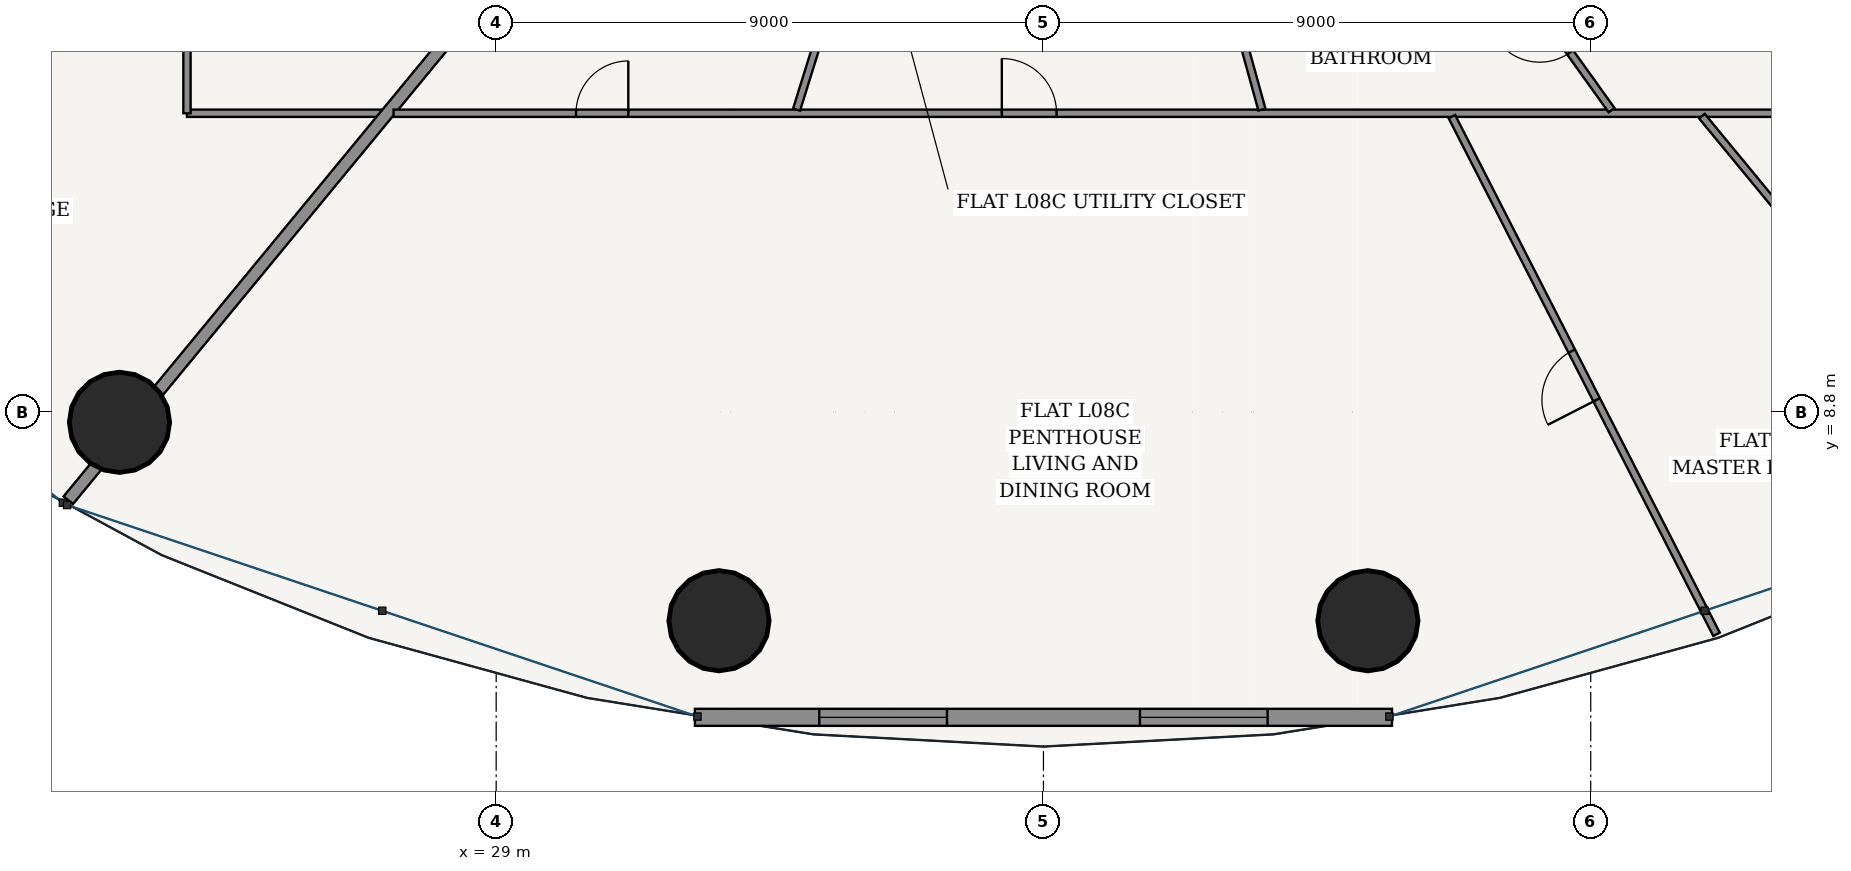
"""IFC4 building model, lengths in metres.
Left out: names, types, materials, properties, quantities, classifications, styles, units other than length and angle.
Written with IfcOpenShell. Run it as: python <this file> out.ifc"""

import sys

from ifc_helpers import new_model, si_unit, direction, frame, frame_2d, origin, origin_2d, place, context, subcontext, project, spatial, rectangle, hollow_circle, extrude, source, transform, mapped, element, fill, save


model = new_model("IFC4")
c1 = context("Model", 3, precision=1e-05, world=origin(), true_north=direction((-0.2419218956, 0.970295726276)))
c2 = subcontext(c1, "Body", "Model", "MODEL_VIEW")
j1 = project(units=[si_unit("LENGTHUNIT", "METRE"), si_unit("PLANEANGLEUNIT", "RADIAN")], contexts=[c1])
p1 = place(None, origin())
s1 = spatial("IfcSite", under=j1, at=p1, CompositionType="ELEMENT")
p2 = place(p1, origin())
s2 = spatial("IfcBuilding", under=s1, at=p2, CompositionType="ELEMENT")
p3 = place(p2, frame((0.0, 0.0, 34.8)))
s3 = spatial("IfcBuildingStorey", under=s2, at=p3, CompositionType="ELEMENT", Elevation=34.8)
for number, where, z_axis, x_axis in (
    (1, (22.805, 8.632, 0.0), (0.0, 0.0, 1.0), (1.0, 0.0, 0.0)),
    (2, (32.664, 5.37, 0.0), (0.0, 0.0, 1.0), (1.0, 0.0, 0.0)),
    (3, (43.336, 5.37, 0.0), (0.0, 0.0, 1.0), (1.0, 0.0, 0.0)),
):
    element("IfcColumn", number, at=place(p3, frame(where, z_axis=z_axis, x_axis=x_axis)), inside=s3, PredefinedType="COLUMN", context=c2, shape_type="SweptSolid", body=[
        extrude(hollow_circle(Radius=0.825, WallThickness=0.05, at=origin_2d()), origin(), (0.0, 0.0, 1.0), 3.6),
    ])
p4 = place(p3, frame((32.268, 3.781, 0.0), z_axis=(0.0, 0.0, 1.0), x_axis=(1.0, 0.0, 0.0)))
e4 = element("IfcWall", 4, at=p4, inside=s3, PredefinedType="SOLIDWALL", context=c2, shape_type="SweptSolid", body=[
    extrude(rectangle(XDim=11.463, YDim=0.28, at=frame_2d((5.732, 0.0))), origin(), (0.0, 0.0, 1.0), 3.32),
])
p5 = place(p4, frame((2.045, 0.0, 0.85)))
e5 = element("IfcOpeningElement", 5, at=p5, cuts=e4, PredefinedType="OPENING", context=c2, shape_type="SweptSolid", body=[
    extrude(rectangle(XDim=2.1, YDim=1.95, at=frame_2d((1.05, 0.975))), frame((0.0, 0.15, 0.0), z_axis=(0.0, -1.0, 0.0), x_axis=(1.0, 0.0, 0.0)), (0.0, 0.0, 1.0), 0.3),
])
p6 = place(p4, frame((7.318, 0.0, 0.85)))
e6 = element("IfcOpeningElement", 6, at=p6, cuts=e4, PredefinedType="OPENING", context=c2, shape_type="SweptSolid", body=[
    extrude(rectangle(XDim=2.1, YDim=1.95, at=frame_2d((1.05, 0.975))), frame((0.0, 0.15, 0.0), z_axis=(0.0, -1.0, 0.0), x_axis=(1.0, 0.0, 0.0)), (0.0, 0.0, 1.0), 0.3),
])
p7 = place(p3, frame((27.109, 13.715, 0.0), z_axis=(0.0, 0.0, 1.0), x_axis=(-1.0, 0.0, 0.0)))
e7 = element("IfcWall", 7, at=p7, inside=s3, PredefinedType="PARTITIONING", context=c2, shape_type="SweptSolid", body=[
    extrude(rectangle(XDim=3.194, YDim=0.12, at=frame_2d((1.597, 0.0))), origin(), (0.0, 0.0, 1.0), 2.688),
])
p8 = place(p3, frame((23.915, 13.715, 0.0), z_axis=(0.0, 0.0, 1.0), x_axis=(0.0, 1.0, 0.0)))
e8 = element("IfcWall", 8, at=p8, inside=s3, PredefinedType="PARTITIONING", context=c2, shape_type="SweptSolid", body=[
    extrude(rectangle(XDim=26.17, YDim=0.12, at=frame_2d((13.085, 0.0))), origin(), (0.0, 0.0, 1.0), 2.688),
])
p9 = place(p8, frame((1.895, 0.0, 0.0)))
e9 = element("IfcOpeningElement", 9, at=p9, cuts=e8, PredefinedType="OPENING", context=c2, shape_type="SweptSolid", body=[
    extrude(rectangle(XDim=0.9, YDim=2.15, at=frame_2d((0.45, 1.075))), frame((0.0, 0.07, 0.0), z_axis=(0.0, -1.0, 0.0), x_axis=(1.0, 0.0, 0.0)), (0.0, 0.0, 1.0), 0.14),
])
p10 = place(p8, frame((11.498, 0.0, 0.0)))
e10 = element("IfcOpeningElement", 10, at=p10, cuts=e8, PredefinedType="OPENING", context=c2, shape_type="SweptSolid", body=[
    extrude(rectangle(XDim=0.9, YDim=2.15, at=frame_2d((0.45, 1.075))), frame((0.0, 0.07, 0.0), z_axis=(0.0, -1.0, 0.0), x_axis=(1.0, 0.0, 0.0)), (0.0, 0.0, 1.0), 0.14),
])
p11 = place(p8, frame((23.831, 0.0, 0.0)))
e11 = element("IfcOpeningElement", 11, at=p11, cuts=e8, PredefinedType="OPENING", context=c2, shape_type="SweptSolid", body=[
    extrude(rectangle(XDim=0.86, YDim=2.15, at=frame_2d((0.43, 1.075))), frame((0.0, 0.07, 0.0), z_axis=(0.0, -1.0, 0.0), x_axis=(1.0, 0.0, 0.0)), (0.0, 0.0, 1.0), 0.14),
])
p12 = place(p3, frame((23.861, 19.144, 0.0), z_axis=(0.0, 0.0, 1.0), x_axis=(-0.879372452045, -0.476134529922, 0.0)))
e12 = element("IfcWall", 12, at=p12, inside=s3, PredefinedType="PARTITIONING", context=c2, shape_type="SweptSolid", body=[
    extrude(rectangle(XDim=11.219, YDim=0.12, at=frame_2d((5.61, 0.0))), origin(), (0.0, 0.0, 1.0), 2.688),
])
p13 = place(p12, frame((4.097, 0.0, 0.0)))
e13 = element("IfcOpeningElement", 13, at=p13, cuts=e12, PredefinedType="OPENING", context=c2, shape_type="SweptSolid", body=[
    extrude(rectangle(XDim=0.9, YDim=2.15, at=frame_2d((0.45, 1.075))), frame((0.0, 0.07, 0.0), z_axis=(0.0, -1.0, 0.0), x_axis=(1.0, 0.0, 0.0)), (0.0, 0.0, 1.0), 0.14),
])
p14 = place(p3, frame((29.396, 16.365, 0.0), z_axis=(0.0, 0.0, 1.0), x_axis=(-0.636186165667, -0.771535587393, 0.0)))
e14 = element("IfcWall", 14, at=p14, inside=s3, PredefinedType="PARTITIONING", context=c2, shape_type="SweptSolid", body=[
    extrude(rectangle(XDim=11.683, YDim=0.2, at=frame_2d((5.842, 0.0))), origin(), (0.0, 0.0, 1.0), 2.688),
])
p15 = place(p3, frame((52.085, 13.715, 0.0), z_axis=(0.0, 0.0, 1.0), x_axis=(-1.0, 0.0, 0.0)))
e15 = element("IfcWall", 15, at=p15, inside=s3, PredefinedType="PARTITIONING", context=c2, shape_type="SweptSolid", body=[
    extrude(rectangle(XDim=24.772, YDim=0.12, at=frame_2d((12.386, 0.0))), origin(), (0.0, 0.0, 1.0), 2.688),
])
p16 = place(p15, frame((20.912, 0.0, 0.0)))
e16 = element("IfcOpeningElement", 16, at=p16, cuts=e15, PredefinedType="OPENING", context=c2, shape_type="SweptSolid", body=[
    extrude(rectangle(XDim=0.86, YDim=2.15, at=frame_2d((0.43, 1.075))), frame((0.0, 0.07, 0.0), z_axis=(0.0, -1.0, 0.0), x_axis=(1.0, 0.0, 0.0)), (0.0, 0.0, 1.0), 0.14),
])
p17 = place(p15, frame((13.87, 0.0, 0.0)))
e17 = element("IfcOpeningElement", 17, at=p17, cuts=e15, PredefinedType="OPENING", context=c2, shape_type="SweptSolid", body=[
    extrude(rectangle(XDim=0.9, YDim=2.15, at=frame_2d((0.45, 1.075))), frame((0.0, 0.07, 0.0), z_axis=(0.0, -1.0, 0.0), x_axis=(1.0, 0.0, 0.0)), (0.0, 0.0, 1.0), 0.14),
])
p18 = place(p3, frame((44.717, 13.66, 0.0), z_axis=(0.0, 0.0, 1.0), x_axis=(0.455131303234, -0.890424335256, 0.0)))
e18 = element("IfcWall", 18, at=p18, inside=s3, PredefinedType="PARTITIONING", context=c2, shape_type="SweptSolid", body=[
    extrude(rectangle(XDim=9.562, YDim=0.12, at=frame_2d((4.781, 0.0))), origin(), (0.0, 0.0, 1.0), 2.762),
])
p19 = place(p18, frame((4.331, 0.0, 0.0)))
e19 = element("IfcOpeningElement", 19, at=p19, cuts=e18, PredefinedType="OPENING", context=c2, shape_type="SweptSolid", body=[
    extrude(rectangle(XDim=0.9, YDim=2.15, at=frame_2d((0.45, 1.075))), frame((0.0, 0.07, 0.0), z_axis=(0.0, -1.0, 0.0), x_axis=(1.0, 0.0, 0.0)), (0.0, 0.0, 1.0), 0.14),
])
p20 = place(p3, frame((48.829, 13.667, 0.0), z_axis=(0.0, 0.0, 1.0), x_axis=(0.636177533893, -0.771542704826, 0.0)))
e20 = element("IfcWall", 20, at=p20, inside=s3, PredefinedType="PARTITIONING", context=c2, shape_type="SweptSolid", body=[
    extrude(rectangle(XDim=8.187, YDim=0.12, at=frame_2d((4.093, 0.0))), origin(), (0.0, 0.0, 1.0), 2.688),
])
p21 = place(p20, frame((2.584, 0.0, 0.0)))
e21 = element("IfcOpeningElement", 21, at=p21, cuts=e20, PredefinedType="OPENING", context=c2, shape_type="SweptSolid", body=[
    extrude(rectangle(XDim=0.9, YDim=2.15, at=frame_2d((0.45, 1.075))), frame((0.0, 0.07, 0.0), z_axis=(0.0, -1.0, 0.0), x_axis=(1.0, 0.0, 0.0)), (0.0, 0.0, 1.0), 0.14),
])
p22 = place(p3, frame((34.748, 16.365, 0.0), z_axis=(0.0, 0.0, 1.0), x_axis=(-0.297598752493, -0.954691040345, 0.0)))
e22 = element("IfcWall", 22, at=p22, inside=s3, PredefinedType="PARTITIONING", context=c2, shape_type="SweptSolid", body=[
    extrude(rectangle(XDim=2.714, YDim=0.12, at=frame_2d((1.357, 0.0))), origin(), (0.0, 0.0, 1.0), 3.32),
])
p23 = place(p3, frame((40.878, 16.365, 0.0), z_axis=(0.0, 0.0, 1.0), x_axis=(0.265853298244, -0.964013497734, 0.0)))
e23 = element("IfcWall", 23, at=p23, inside=s3, PredefinedType="PARTITIONING", context=c2, shape_type="SweptSolid", body=[
    extrude(rectangle(XDim=2.687, YDim=0.12, at=frame_2d((1.344, 0.0))), origin(), (0.0, 0.0, 1.0), 3.32),
])
p24 = place(p3, frame((45.48, 16.365, 0.0), z_axis=(0.0, 0.0, 1.0), x_axis=(0.582566008831, -0.812783393872, 0.0)))
e24 = element("IfcWall", 24, at=p24, inside=s3, PredefinedType="PARTITIONING", context=c2, shape_type="SweptSolid", body=[
    extrude(rectangle(XDim=3.198, YDim=0.12, at=frame_2d((1.599, 0.0))), origin(), (0.0, 0.0, 1.0), 3.32),
])
p25 = place(p24, frame((1.169, 0.0, 0.0)))
e25 = element("IfcOpeningElement", 25, at=p25, cuts=e24, PredefinedType="OPENING", context=c2, shape_type="SweptSolid", body=[
    extrude(rectangle(XDim=0.86, YDim=2.15, at=frame_2d((0.43, 1.075))), frame((0.0, 0.07, 0.0), z_axis=(0.0, -1.0, 0.0), x_axis=(1.0, 0.0, 0.0)), (0.0, 0.0, 1.0), 0.14),
])
m1 = source(origin(), c2, "Body", "SweptSolid", [
    extrude(rectangle(XDim=2.1, YDim=1.95, at=frame_2d((1.05, 0.975))), frame((0.0, 0.03, 0.0), z_axis=(0.0, -1.0, 0.0), x_axis=(1.0, 0.0, 0.0)), (0.0, 0.0, 1.0), 0.06),
])
p26 = place(p5, origin())
e26 = element("IfcWindow", 26, at=p26, inside=s3, PartitioningType="SINGLE_PANEL", PredefinedType="WINDOW", context=c2, shape_type="MappedRepresentation", body=[
    mapped(m1, transform((0.0, 0.0, 0.0), scale=1.0)),
])
fill(e5, e26)
p27 = place(p6, origin())
e27 = element("IfcWindow", 27, at=p27, inside=s3, PartitioningType="SINGLE_PANEL", PredefinedType="WINDOW", context=c2, shape_type="MappedRepresentation", body=[
    mapped(m1, transform((0.0, 0.0, 0.0), scale=1.0)),
])
fill(e6, e27)
m2 = source(origin(), c2, "Body", "SweptSolid", [
    extrude(rectangle(XDim=0.86, YDim=2.15, at=frame_2d((0.43, 1.075))), frame((0.0, 0.025, 0.0), z_axis=(0.0, -1.0, 0.0), x_axis=(1.0, 0.0, 0.0)), (0.0, 0.0, 1.0), 0.05),
])
p28 = place(p25, frame((0.86, 0.0, 0.0), z_axis=(0.0, 0.0, 1.0), x_axis=(-1.0, 0.0, 0.0)))
e28 = element("IfcDoor", 28, at=p28, inside=s3, OperationType="SINGLE_SWING_RIGHT", PredefinedType="DOOR", context=c2, shape_type="MappedRepresentation", body=[
    mapped(m2, transform((0.0, 0.0, 0.0), scale=1.0)),
])
fill(e25, e28)
m3 = source(origin(), c2, "Body", "SweptSolid", [
    extrude(rectangle(XDim=0.9, YDim=2.15, at=frame_2d((0.45, 1.075))), frame((0.0, 0.025, 0.0), z_axis=(0.0, -1.0, 0.0), x_axis=(1.0, 0.0, 0.0)), (0.0, 0.0, 1.0), 0.05),
])
p29 = place(p19, frame((0.9, 0.0, 0.0), z_axis=(0.0, 0.0, 1.0), x_axis=(-1.0, 0.0, 0.0)))
e29 = element("IfcDoor", 29, at=p29, inside=s3, OperationType="SINGLE_SWING_LEFT", PredefinedType="DOOR", context=c2, shape_type="MappedRepresentation", body=[
    mapped(m3, transform((0.0, 0.0, 0.0), scale=1.0)),
])
fill(e19, e29)
p30 = place(p16, frame((0.86, 0.0, 0.0), z_axis=(0.0, 0.0, 1.0), x_axis=(-1.0, 0.0, 0.0)))
e30 = element("IfcDoor", 30, at=p30, inside=s3, OperationType="SINGLE_SWING_RIGHT", PredefinedType="DOOR", context=c2, shape_type="MappedRepresentation", body=[
    mapped(m2, transform((0.0, 0.0, 0.0), scale=1.0)),
])
fill(e16, e30)
p31 = place(p17, frame((0.9, 0.0, 0.0), z_axis=(0.0, 0.0, 1.0), x_axis=(-1.0, 0.0, 0.0)))
e31 = element("IfcDoor", 31, at=p31, inside=s3, OperationType="SINGLE_SWING_LEFT", PredefinedType="DOOR", context=c2, shape_type="MappedRepresentation", body=[
    mapped(m3, transform((0.0, 0.0, 0.0), scale=1.0)),
])
fill(e17, e31)
save(model, sys.argv[1])
